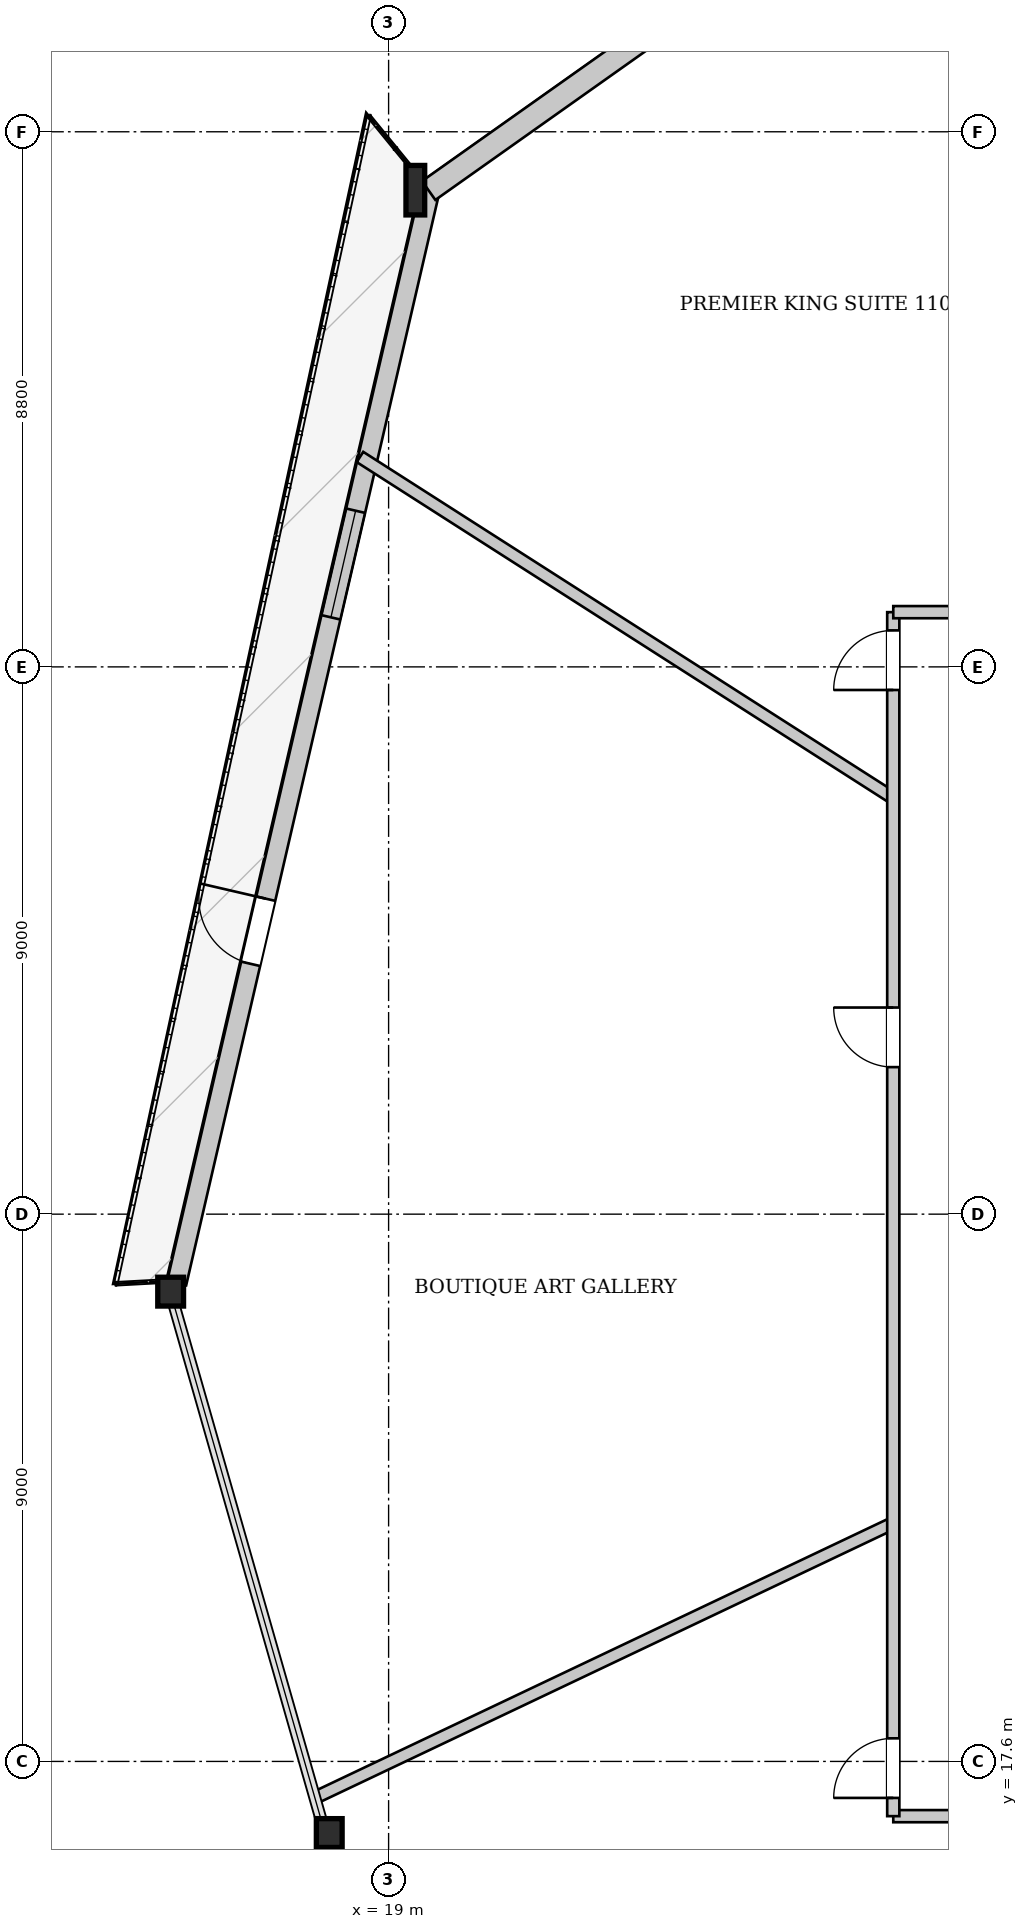
"""IFC4 building model, lengths in metres.
Left out: names, types, materials, properties, quantities, classifications, styles, units other than length and angle.
Written with IfcOpenShell. Run it as: python <this file> out.ifc"""

import sys

from ifc_helpers import new_model, si_unit, direction, frame, frame_2d, origin, origin_2d, place, context, subcontext, project, spatial, rectangle, i_section, extrude, source, transform, mapped, element, fill, save


model = new_model("IFC4")
c1 = context("Model", 3, precision=1e-05, world=origin(), true_north=direction((0.0, 1.0)))
c2 = subcontext(c1, "Body", "Model", "MODEL_VIEW")
j1 = project(units=[si_unit("LENGTHUNIT", "METRE"), si_unit("PLANEANGLEUNIT", "RADIAN")], contexts=[c1])
p1 = place(None, origin())
s1 = spatial("IfcSite", under=j1, at=p1, CompositionType="ELEMENT")
p2 = place(p1, origin())
s2 = spatial("IfcBuilding", under=s1, at=p2, CompositionType="ELEMENT")
p3 = place(p2, frame((0.0, 0.0, 47.05)))
s3 = spatial("IfcBuildingStorey", under=s2, at=p3, CompositionType="ELEMENT", Elevation=47.05)
m1 = source(origin(), c2, "Body", "SweptSolid", [
    extrude(i_section(OverallWidth=0.308, OverallDepth=0.814, WebThickness=0.021, FlangeThickness=0.04, at=origin_2d()), origin(), (0.0, 0.0, 1.0), 3.405),
])
p4 = place(p3, frame((19.55, 43.589, 0.0), z_axis=(-0.064667814066, -0.087824913781, 0.99403463639), x_axis=(0.805254059608, -0.592929927972, 0.0)))
e1 = element("IfcColumn", 1, at=p4, inside=s3, PredefinedType="COLUMN", context=c2, shape_type="MappedRepresentation", body=[
    mapped(m1, transform((0.0, 0.0, 0.0), x_axis=(1.0, 0.0, 0.0), y_axis=(0.0, 1.0, 0.0), z_axis=(0.0, 0.0, 1.0), scale=1.0)),
])
m2 = source(origin(), c2, "Body", "SweptSolid", [
    extrude(i_section(OverallWidth=0.424, OverallDepth=0.474, WebThickness=0.043, FlangeThickness=0.068, at=origin_2d()), origin(), (0.0, 0.0, 1.0), 3.405),
])
p5 = place(p3, frame((15.358, 25.501, 0.0), z_axis=(0.033555804758, -0.102890127836, 0.994126566168), x_axis=(0.95071710334, 0.310059654609, 0.0)))
e2 = element("IfcColumn", 2, at=p5, inside=s3, PredefinedType="COLUMN", context=c2, shape_type="MappedRepresentation", body=[
    mapped(m2, transform((0.0, 0.0, 0.0), x_axis=(1.0, 0.0, 0.0), y_axis=(0.0, 1.0, 0.0), z_axis=(0.0, 0.0, 1.0), scale=1.0)),
])
m3 = source(origin(), c2, "Body", "SweptSolid", [
    extrude(i_section(OverallWidth=0.424, OverallDepth=0.474, WebThickness=0.043, FlangeThickness=0.068, at=origin_2d()), origin(), (0.0, 0.0, 1.0), 3.406),
])
p6 = place(p3, frame((17.909, 16.575, 0.0), z_axis=(0.067226660007, -0.089587766534, 0.993707506398), x_axis=(0.799846403286, 0.600204741026, 0.0)))
e3 = element("IfcColumn", 3, at=p6, inside=s3, PredefinedType="COLUMN", context=c2, shape_type="MappedRepresentation", body=[
    mapped(m3, transform((0.0, 0.0, 0.0), x_axis=(1.0, 0.0, 0.0), y_axis=(0.0, 1.0, 0.0), z_axis=(0.0, 0.0, 1.0), scale=1.0)),
])
p7 = place(p3, frame((15.514, 25.465, 0.0), z_axis=(0.0, 0.0, 1.0), x_axis=(0.225730433285, 0.9741898026, 0.0)))
e4 = element("IfcWall", 4, at=p7, inside=s3, PredefinedType="SOLIDWALL", context=c2, shape_type="SweptSolid", body=[
    extrude(rectangle(XDim=18.567, YDim=0.32, at=frame_2d((9.284, 0.0))), origin(), (0.0, 0.0, 1.0), 2.592),
])
p8 = place(p7, frame((5.391, 0.0, 0.0)))
e5 = element("IfcOpeningElement", 5, at=p8, cuts=e4, PredefinedType="OPENING", context=c2, shape_type="SweptSolid", body=[
    extrude(rectangle(XDim=1.1, YDim=2.3, at=frame_2d((0.55, 1.15))), frame((0.0, 0.17, 0.0), z_axis=(0.0, -1.0, 0.0), x_axis=(1.0, 0.0, 0.0)), (0.0, 0.0, 1.0), 0.34),
])
p9 = place(p7, frame((11.24, 0.0, 0.272)))
e6 = element("IfcOpeningElement", 6, at=p9, cuts=e4, PredefinedType="OPENING", context=c2, shape_type="SweptSolid", body=[
    extrude(rectangle(XDim=1.8, YDim=2.2, at=frame_2d((0.9, 1.1))), frame((0.0, 0.17, 0.0), z_axis=(0.0, -1.0, 0.0), x_axis=(1.0, 0.0, 0.0)), (0.0, 0.0, 1.0), 0.34),
])
p10 = place(p3, frame((19.659, 43.434, 0.0), z_axis=(0.0, 0.0, 1.0), x_axis=(0.816108940035, 0.577898086167, 0.0)))
e7 = element("IfcWall", 7, at=p10, inside=s3, PredefinedType="SOLIDWALL", context=c2, shape_type="SweptSolid", body=[
    extrude(rectangle(XDim=6.419, YDim=0.38, at=frame_2d((3.209, 0.0))), origin(), (0.0, 0.0, 1.0), 2.592),
])
p11 = place(p3, frame((27.3, 33.443, 0.0), z_axis=(0.0, 0.0, 1.0), x_axis=(-0.842452354431, 0.538770851581, 0.0)))
e8 = element("IfcWall", 8, at=p11, inside=s3, PredefinedType="PARTITIONING", context=c2, shape_type="SweptSolid", body=[
    extrude(rectangle(XDim=10.411, YDim=0.2, at=frame_2d((5.206, 0.0))), origin(), (0.0, 0.0, 1.0), 3.3),
])
p12 = place(p3, frame((27.3, 21.519, 0.0), z_axis=(0.0, 0.0, 1.0), x_axis=(-0.90333786909, -0.428929707839, 0.0)))
e9 = element("IfcWall", 9, at=p12, inside=s3, PredefinedType="PARTITIONING", context=c2, shape_type="SweptSolid", body=[
    extrude(rectangle(XDim=10.5, YDim=0.2, at=frame_2d((5.25, 0.0))), origin(), (0.0, 0.0, 1.0), 3.3),
])
p13 = place(p3, frame((27.3, 16.7, 0.0), z_axis=(0.0, 0.0, 1.0), x_axis=(1.0, 0.0, 0.0)))
e10 = element("IfcWall", 10, at=p13, inside=s3, PredefinedType="PARTITIONING", context=c2, shape_type="SweptSolid", body=[
    extrude(rectangle(XDim=21.4, YDim=0.2, at=frame_2d((10.7, 0.0))), origin(), (0.0, 0.0, 1.0), 3.3),
])
p14 = place(p13, frame((13.944, 0.0, 0.0)))
e11 = element("IfcOpeningElement", 11, at=p14, cuts=e10, PredefinedType="OPENING", context=c2, shape_type="SweptSolid", body=[
    extrude(rectangle(XDim=0.98, YDim=2.15, at=frame_2d((0.49, 1.075))), frame((0.0, 0.11, 0.0), z_axis=(0.0, -1.0, 0.0), x_axis=(1.0, 0.0, 0.0)), (0.0, 0.0, 1.0), 0.22),
])
p15 = place(p3, frame((27.3, 16.7, 0.0), z_axis=(0.0, 0.0, 1.0), x_axis=(0.0, 1.0, 0.0)))
e12 = element("IfcWall", 12, at=p15, inside=s3, PredefinedType="PARTITIONING", context=c2, shape_type="SweptSolid", body=[
    extrude(rectangle(XDim=19.8, YDim=0.2, at=frame_2d((9.9, 0.0))), origin(), (0.0, 0.0, 1.0), 3.3),
])
p16 = place(p15, frame((18.52, 0.0, 0.0)))
e13 = element("IfcOpeningElement", 13, at=p16, cuts=e12, PredefinedType="OPENING", context=c2, shape_type="SweptSolid", body=[
    extrude(rectangle(XDim=0.98, YDim=2.15, at=frame_2d((0.49, 1.075))), frame((0.0, 0.11, 0.0), z_axis=(0.0, -1.0, 0.0), x_axis=(1.0, 0.0, 0.0)), (0.0, 0.0, 1.0), 0.22),
])
p17 = place(p15, frame((12.318, 0.0, 0.0)))
e14 = element("IfcOpeningElement", 14, at=p17, cuts=e12, PredefinedType="OPENING", context=c2, shape_type="SweptSolid", body=[
    extrude(rectangle(XDim=0.98, YDim=2.15, at=frame_2d((0.49, 1.075))), frame((0.0, 0.11, 0.0), z_axis=(0.0, -1.0, 0.0), x_axis=(1.0, 0.0, 0.0)), (0.0, 0.0, 1.0), 0.22),
])
p18 = place(p15, frame((0.3, 0.0, 0.0)))
e15 = element("IfcOpeningElement", 15, at=p18, cuts=e12, PredefinedType="OPENING", context=c2, shape_type="SweptSolid", body=[
    extrude(rectangle(XDim=0.98, YDim=2.15, at=frame_2d((0.49, 1.075))), frame((0.0, 0.11, 0.0), z_axis=(0.0, -1.0, 0.0), x_axis=(1.0, 0.0, 0.0)), (0.0, 0.0, 1.0), 0.22),
])
p19 = place(p3, frame((27.3, 36.5, 0.0), z_axis=(0.0, 0.0, 1.0), x_axis=(1.0, 0.0, 0.0)))
e16 = element("IfcWall", 16, at=p19, inside=s3, PredefinedType="PARTITIONING", context=c2, shape_type="SweptSolid", body=[
    extrude(rectangle(XDim=21.4, YDim=0.2, at=frame_2d((10.7, 0.0))), origin(), (0.0, 0.0, 1.0), 3.3),
])
p20 = place(p19, frame((17.909, 0.0, 0.0)))
e17 = element("IfcOpeningElement", 17, at=p20, cuts=e16, PredefinedType="OPENING", context=c2, shape_type="SweptSolid", body=[
    extrude(rectangle(XDim=0.98, YDim=2.15, at=frame_2d((0.49, 1.075))), frame((0.0, 0.11, 0.0), z_axis=(0.0, -1.0, 0.0), x_axis=(1.0, 0.0, 0.0)), (0.0, 0.0, 1.0), 0.22),
])
m4 = source(origin(), c2, "Body", "SweptSolid", [
    extrude(rectangle(XDim=1.1, YDim=2.3, at=frame_2d((0.55, 1.15))), frame((0.0, 0.025, 0.0), z_axis=(0.0, -1.0, 0.0), x_axis=(1.0, 0.0, 0.0)), (0.0, 0.0, 1.0), 0.05),
])
p21 = place(p8, origin())
e18 = element("IfcDoor", 18, at=p21, inside=s3, OperationType="SINGLE_SWING_RIGHT", PredefinedType="DOOR", context=c2, shape_type="MappedRepresentation", body=[
    mapped(m4, transform((0.0, 0.0, 0.0), x_axis=(1.0, 0.0, 0.0), y_axis=(0.0, 1.0, 0.0), z_axis=(0.0, 0.0, 1.0), scale=1.0)),
])
fill(e5, e18)
m5 = source(origin(), c2, "Body", "SweptSolid", [
    extrude(rectangle(XDim=1.8, YDim=2.2, at=frame_2d((0.9, 1.1))), frame((0.0, 0.03, 0.0), z_axis=(0.0, -1.0, 0.0), x_axis=(1.0, 0.0, 0.0)), (0.0, 0.0, 1.0), 0.06),
])
p22 = place(p9, origin())
e19 = element("IfcWindow", 19, at=p22, inside=s3, PartitioningType="SINGLE_PANEL", PredefinedType="WINDOW", context=c2, shape_type="MappedRepresentation", body=[
    mapped(m5, transform((0.0, 0.0, 0.0), x_axis=(1.0, 0.0, 0.0), y_axis=(0.0, 1.0, 0.0), z_axis=(0.0, 0.0, 1.0), scale=1.0)),
])
fill(e6, e19)
m6 = source(origin(), c2, "Body", "SweptSolid", [
    extrude(rectangle(XDim=0.98, YDim=2.15, at=frame_2d((0.49, 1.075))), frame((0.0, 0.025, 0.0), z_axis=(0.0, -1.0, 0.0), x_axis=(1.0, 0.0, 0.0)), (0.0, 0.0, 1.0), 0.05),
])
p23 = place(p16, origin())
e20 = element("IfcDoor", 20, at=p23, inside=s3, OperationType="SINGLE_SWING_LEFT", PredefinedType="DOOR", context=c2, shape_type="MappedRepresentation", body=[
    mapped(m6, transform((0.0, 0.0, 0.0), x_axis=(1.0, 0.0, 0.0), y_axis=(0.0, 1.0, 0.0), z_axis=(0.0, 0.0, 1.0), scale=1.0)),
])
fill(e13, e20)
p24 = place(p17, origin())
e21 = element("IfcDoor", 21, at=p24, inside=s3, OperationType="SINGLE_SWING_RIGHT", PredefinedType="DOOR", context=c2, shape_type="MappedRepresentation", body=[
    mapped(m6, transform((0.0, 0.0, 0.0), x_axis=(1.0, 0.0, 0.0), y_axis=(0.0, 1.0, 0.0), z_axis=(0.0, 0.0, 1.0), scale=1.0)),
])
fill(e14, e21)
p25 = place(p18, origin())
e22 = element("IfcDoor", 22, at=p25, inside=s3, OperationType="SINGLE_SWING_LEFT", PredefinedType="DOOR", context=c2, shape_type="MappedRepresentation", body=[
    mapped(m6, transform((0.0, 0.0, 0.0), x_axis=(1.0, 0.0, 0.0), y_axis=(0.0, 1.0, 0.0), z_axis=(0.0, 0.0, 1.0), scale=1.0)),
])
fill(e15, e22)
save(model, sys.argv[1])
